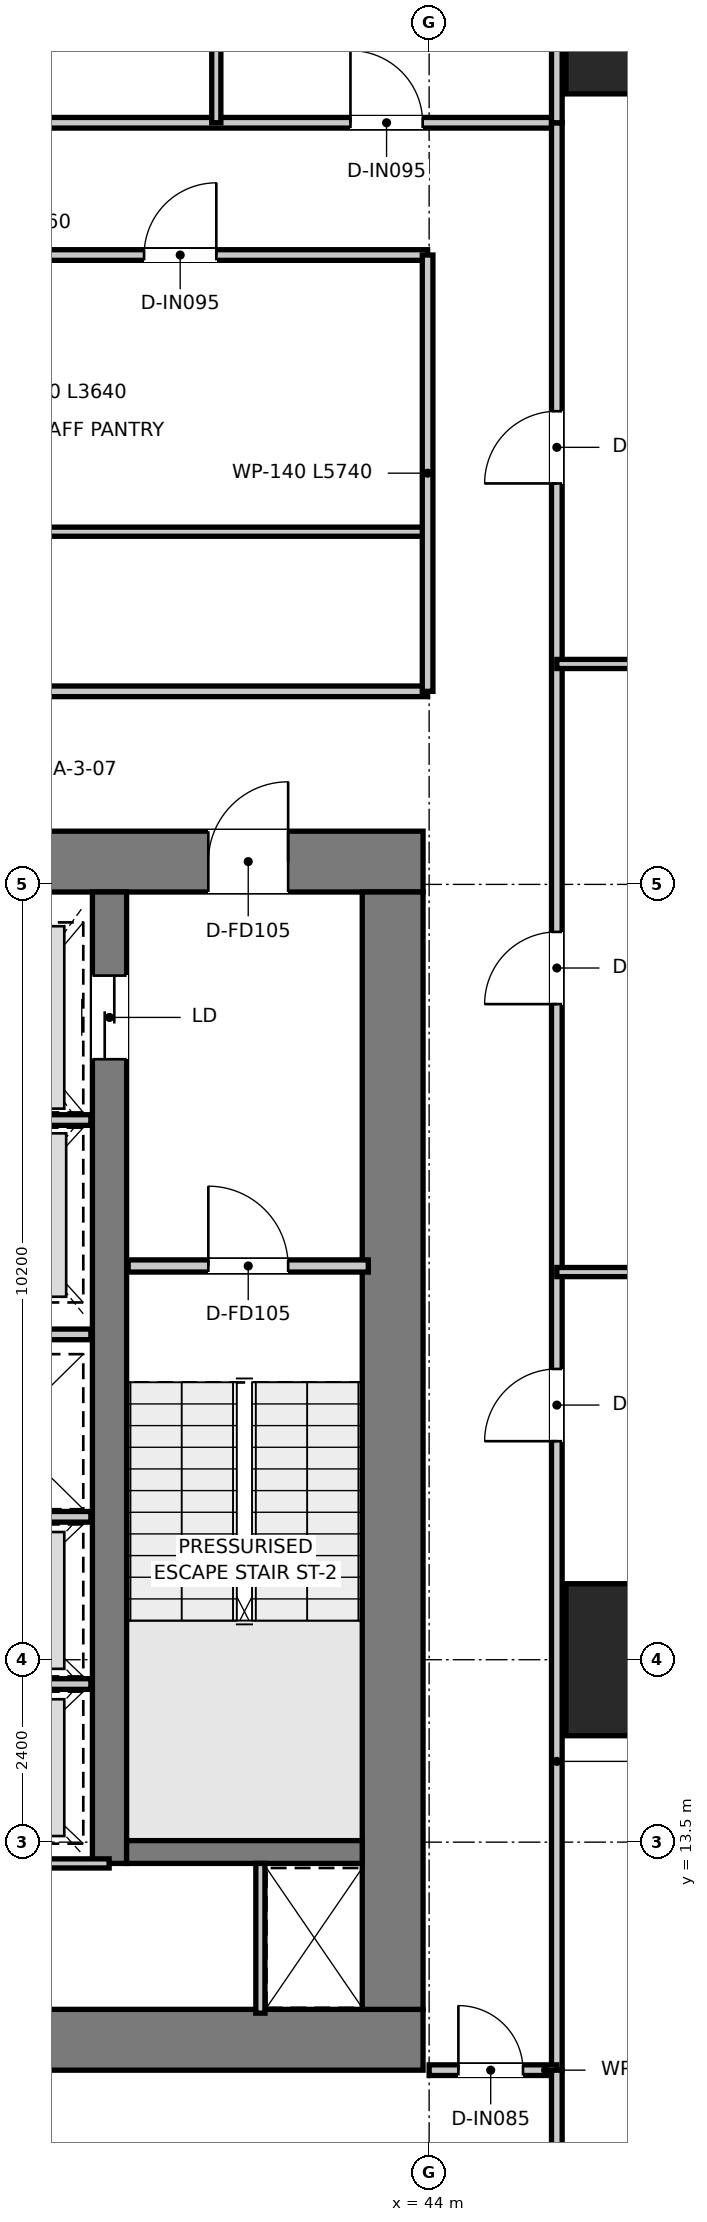
"""IFC4 building model, lengths in metres.
Left out: names, types, materials, properties, quantities, classifications, styles, units other than length and angle.
Written with IfcOpenShell. Run it as: python <this file> out.ifc"""

import sys

from ifc_helpers import new_model, si_unit, direction, frame, frame_2d, origin, origin_2d, place, context, subcontext, project, spatial, rectangle, extrude, source, transform, mapped, element, fill, save


model = new_model("IFC4")
c1 = context("Model", 3, precision=1e-05, world=origin(), true_north=direction((0.0, 1.0)))
c2 = subcontext(c1, "Body", "Model", "MODEL_VIEW")
j1 = project(units=[si_unit("LENGTHUNIT", "METRE"), si_unit("PLANEANGLEUNIT", "RADIAN")], contexts=[c1])
p1 = place(None, origin())
s1 = spatial("IfcSite", under=j1, at=p1, CompositionType="ELEMENT")
p2 = place(p1, origin())
s2 = spatial("IfcBuilding", under=s1, at=p2, CompositionType="ELEMENT")
p3 = place(p2, frame((0.0, 0.0, 97.95)))
s3 = spatial("IfcBuildingStorey", under=s2, at=p3, CompositionType="ELEMENT", Elevation=97.95)
p4 = place(p3, frame((28.08, 10.9, 0.0), z_axis=(0.0, 0.0, 1.0), x_axis=(1.0, 0.0, 0.0)))
e1 = element("IfcWall", 1, at=p4, inside=s3, PredefinedType="SHEAR", context=c2, shape_type="SweptSolid", body=[
    extrude(rectangle(XDim=15.84, YDim=0.8, at=frame_2d((7.92, 0.0))), origin(), (0.0, 0.0, 1.0), 3.95),
])
p5 = place(p3, frame((28.08, 26.4, 0.0), z_axis=(0.0, 0.0, 1.0), x_axis=(1.0, 0.0, 0.0)))
e2 = element("IfcWall", 2, at=p5, inside=s3, PredefinedType="SHEAR", context=c2, shape_type="SweptSolid", body=[
    extrude(rectangle(XDim=15.84, YDim=0.8, at=frame_2d((7.92, 0.0))), origin(), (0.0, 0.0, 1.0), 3.95),
])
p6 = place(p5, frame((7.22, 0.0, 0.0)))
e3 = element("IfcOpeningElement", 3, at=p6, cuts=e2, PredefinedType="OPENING", context=c2, shape_type="SweptSolid", body=[
    extrude(rectangle(XDim=1.4, YDim=2.2, at=frame_2d((0.7, 1.1))), frame((0.0, 0.41, 0.0), z_axis=(0.0, -1.0, 0.0), x_axis=(1.0, 0.0, 0.0)), (0.0, 0.0, 1.0), 0.82),
])
p7 = place(p5, frame((1.775, 0.0, 0.0)))
e4 = element("IfcOpeningElement", 4, at=p7, cuts=e2, PredefinedType="OPENING", context=c2, shape_type="SweptSolid", body=[
    extrude(rectangle(XDim=1.05, YDim=2.1, at=frame_2d((0.525, 1.05))), frame((0.0, 0.41, 0.0), z_axis=(0.0, -1.0, 0.0), x_axis=(1.0, 0.0, 0.0)), (0.0, 0.0, 1.0), 0.82),
])
p8 = place(p5, frame((13.015, 0.0, 0.0)))
e5 = element("IfcOpeningElement", 5, at=p8, cuts=e2, PredefinedType="OPENING", context=c2, shape_type="SweptSolid", body=[
    extrude(rectangle(XDim=1.05, YDim=2.1, at=frame_2d((0.525, 1.05))), frame((0.0, 0.41, 0.0), z_axis=(0.0, -1.0, 0.0), x_axis=(1.0, 0.0, 0.0)), (0.0, 0.0, 1.0), 0.82),
])
p9 = place(p3, frame((43.52, 11.3, 0.0), z_axis=(0.0, 0.0, 1.0), x_axis=(0.0, 1.0, 0.0)))
e6 = element("IfcWall", 6, at=p9, inside=s3, PredefinedType="SHEAR", context=c2, shape_type="SweptSolid", body=[
    extrude(rectangle(XDim=14.7, YDim=0.8, at=frame_2d((7.35, 0.0))), origin(), (0.0, 0.0, 1.0), 3.95),
])
p10 = place(p3, frame((39.795, 13.22, 0.0), z_axis=(0.0, 0.0, 1.0), x_axis=(0.0, 1.0, 0.0)))
e7 = element("IfcWall", 7, at=p10, inside=s3, PredefinedType="SHEAR", context=c2, shape_type="SweptSolid", body=[
    extrude(rectangle(XDim=12.78, YDim=0.45, at=frame_2d((6.39, 0.0))), origin(), (0.0, 0.0, 1.0), 3.95),
])
p11 = place(p10, frame((10.58, 0.0, 0.0)))
e8 = element("IfcOpeningElement", 8, at=p11, cuts=e7, PredefinedType="OPENING", context=c2, shape_type="SweptSolid", body=[
    extrude(rectangle(XDim=1.1, YDim=2.15, at=frame_2d((0.55, 1.075))), frame((0.0, 0.235, 0.0), z_axis=(0.0, -1.0, 0.0), x_axis=(1.0, 0.0, 0.0)), (0.0, 0.0, 1.0), 0.47),
])
p12 = place(p3, frame((40.02, 13.37, 0.0), z_axis=(0.0, 0.0, 1.0), x_axis=(1.0, 0.0, 0.0)))
e9 = element("IfcWall", 9, at=p12, inside=s3, PredefinedType="SHEAR", context=c2, shape_type="SweptSolid", body=[
    extrude(rectangle(XDim=3.1, YDim=0.3, at=frame_2d((1.55, 0.0))), origin(), (0.0, 0.0, 1.0), 3.95),
])
m1 = source(origin(), c2, "Body", "SweptSolid", [
    extrude(rectangle(XDim=2.0, YDim=2.0, at=origin_2d()), origin(), (0.0, 0.0, 1.0), 3.95),
])
for number, where, z_axis, x_axis in (
    (10, (46.8, 15.9, 0.0), (0.0, 0.0, 1.0), (1.0, 0.0, 0.0)),
    (11, (46.8, 37.5, 0.0), (0.0, 0.0, 1.0), (1.0, 0.0, 0.0)),
):
    element("IfcColumn", number, at=place(p3, frame(where, z_axis=z_axis, x_axis=x_axis)), inside=s3, PredefinedType="USERDEFINED", context=c2, shape_type="MappedRepresentation", body=[
        mapped(m1, transform((0.0, 0.0, 0.0), x_axis=(1.0, 0.0, 0.0), y_axis=(0.0, 1.0, 0.0), z_axis=(0.0, 0.0, 1.0), scale=1.0)),
    ])
p13 = place(p3, frame((40.04, 21.08, 0.0), z_axis=(0.0, 0.0, 1.0), x_axis=(1.0, 0.0, 0.0)))
e12 = element("IfcWall", 12, at=p13, inside=s3, PredefinedType="PARTITIONING", context=c2, shape_type="SweptSolid", body=[
    extrude(rectangle(XDim=3.16, YDim=0.16, at=frame_2d((1.58, 0.0))), origin(), (0.0, 0.0, 1.0), 3.67),
])
p14 = place(p13, frame((1.055, 0.0, 0.0)))
e13 = element("IfcOpeningElement", 13, at=p14, cuts=e12, PredefinedType="OPENING", context=c2, shape_type="SweptSolid", body=[
    extrude(rectangle(XDim=1.05, YDim=2.1, at=frame_2d((0.525, 1.05))), frame((0.0, 0.09, 0.0), z_axis=(0.0, -1.0, 0.0), x_axis=(1.0, 0.0, 0.0)), (0.0, 0.0, 1.0), 0.18),
])
p15 = place(p3, frame((37.28, 23.0, 0.0), z_axis=(0.0, 0.0, 1.0), x_axis=(1.0, 0.0, 0.0)))
e14 = element("IfcWall", 14, at=p15, inside=s3, PredefinedType="PARTITIONING", context=c2, shape_type="SweptSolid", body=[
    extrude(rectangle(XDim=2.27, YDim=0.14, at=frame_2d((1.135, 0.0))), origin(), (0.0, 0.0, 1.0), 2.47),
])
for number, where, z_axis, x_axis in (
    (15, (37.28, 17.78, 0.0), (0.0, 0.0, 1.0), (1.0, 0.0, 0.0)),
    (16, (37.28, 20.18, 0.0), (0.0, 0.0, 1.0), (1.0, 0.0, 0.0)),
    (17, (37.28, 15.58, 0.0), (0.0, 0.0, 1.0), (1.0, 0.0, 0.0)),
):
    element("IfcWall", number, at=place(p3, frame(where, z_axis=z_axis, x_axis=x_axis)), inside=s3, PredefinedType="PARTITIONING", context=c2, shape_type="SweptSolid", body=[
        extrude(rectangle(XDim=2.27, YDim=0.14, at=frame_2d((1.135, 0.0))), origin(), (0.0, 0.0, 1.0), 3.67),
    ])
p16 = place(p3, frame((41.78, 11.25, 0.0), z_axis=(0.0, 0.0, 1.0), x_axis=(0.0, 1.0, 0.0)))
e18 = element("IfcWall", 18, at=p16, inside=s3, PredefinedType="PARTITIONING", context=c2, shape_type="SweptSolid", body=[
    extrude(rectangle(XDim=1.97, YDim=0.12, at=frame_2d((0.985, 0.0))), origin(), (0.0, 0.0, 1.0), 3.67),
])
p17 = place(p3, frame((32.21, 13.22, 0.0), z_axis=(0.0, 0.0, 1.0), x_axis=(1.0, 0.0, 0.0)))
e19 = element("IfcWall", 19, at=p17, inside=s3, PredefinedType="PARTITIONING", context=c2, shape_type="SweptSolid", body=[
    extrude(rectangle(XDim=7.58, YDim=0.12, at=frame_2d((3.79, 0.0))), origin(), (0.0, 0.0, 1.0), 3.67),
])
p18 = place(p17, frame((3.365, 0.0, 0.0)))
e20 = element("IfcOpeningElement", 20, at=p18, cuts=e19, PredefinedType="OPENING", context=c2, shape_type="SweptSolid", body=[
    extrude(rectangle(XDim=0.85, YDim=2.1, at=frame_2d((0.425, 1.05))), frame((0.0, 0.07, 0.0), z_axis=(0.0, -1.0, 0.0), x_axis=(1.0, 0.0, 0.0)), (0.0, 0.0, 1.0), 0.14),
])
p19 = place(p3, frame((28.02, 28.64, 0.0), z_axis=(0.0, 0.0, 1.0), x_axis=(1.0, 0.0, 0.0)))
e21 = element("IfcWall", 21, at=p19, inside=s3, PredefinedType="PARTITIONING", context=c2, shape_type="SweptSolid", body=[
    extrude(rectangle(XDim=15.96, YDim=0.14, at=frame_2d((7.98, 0.0))), origin(), (0.0, 0.0, 1.0), 3.08),
])
p20 = place(p19, frame((7.455, 0.0, 0.0)))
e22 = element("IfcOpeningElement", 22, at=p20, cuts=e21, PredefinedType="OPENING", context=c2, shape_type="SweptSolid", body=[
    extrude(rectangle(XDim=1.05, YDim=2.15, at=frame_2d((0.525, 1.075))), frame((0.0, 0.08, 0.0), z_axis=(0.0, -1.0, 0.0), x_axis=(1.0, 0.0, 0.0)), (0.0, 0.0, 1.0), 0.16),
])
p21 = place(p3, frame((28.02, 30.74, 0.0), z_axis=(0.0, 0.0, 1.0), x_axis=(1.0, 0.0, 0.0)))
e23 = element("IfcWall", 23, at=p21, inside=s3, PredefinedType="PARTITIONING", context=c2, shape_type="SweptSolid", body=[
    extrude(rectangle(XDim=15.96, YDim=0.12, at=frame_2d((7.98, 0.0))), origin(), (0.0, 0.0, 1.0), 3.08),
])
p22 = place(p3, frame((28.02, 34.38, 0.0), z_axis=(0.0, 0.0, 1.0), x_axis=(1.0, 0.0, 0.0)))
e24 = element("IfcWall", 24, at=p22, inside=s3, PredefinedType="PARTITIONING", context=c2, shape_type="SweptSolid", body=[
    extrude(rectangle(XDim=15.96, YDim=0.14, at=frame_2d((7.98, 0.0))), origin(), (0.0, 0.0, 1.0), 3.08),
])
p23 = place(p22, frame((1.13, 0.0, 0.0)))
e25 = element("IfcOpeningElement", 25, at=p23, cuts=e24, PredefinedType="OPENING", context=c2, shape_type="SweptSolid", body=[
    extrude(rectangle(XDim=0.9, YDim=2.1, at=frame_2d((0.45, 1.05))), frame((0.0, 0.08, 0.0), z_axis=(0.0, -1.0, 0.0), x_axis=(1.0, 0.0, 0.0)), (0.0, 0.0, 1.0), 0.16),
])
p24 = place(p22, frame((4.33, 0.0, 0.0)))
e26 = element("IfcOpeningElement", 26, at=p24, cuts=e24, PredefinedType="OPENING", context=c2, shape_type="SweptSolid", body=[
    extrude(rectangle(XDim=0.9, YDim=2.1, at=frame_2d((0.45, 1.05))), frame((0.0, 0.08, 0.0), z_axis=(0.0, -1.0, 0.0), x_axis=(1.0, 0.0, 0.0)), (0.0, 0.0, 1.0), 0.16),
])
p25 = place(p22, frame((7.355, 0.0, 0.0)))
e27 = element("IfcOpeningElement", 27, at=p25, cuts=e24, PredefinedType="OPENING", context=c2, shape_type="SweptSolid", body=[
    extrude(rectangle(XDim=0.95, YDim=2.1, at=frame_2d((0.475, 1.05))), frame((0.0, 0.08, 0.0), z_axis=(0.0, -1.0, 0.0), x_axis=(1.0, 0.0, 0.0)), (0.0, 0.0, 1.0), 0.16),
])
p26 = place(p22, frame((12.23, 0.0, 0.0)))
e28 = element("IfcOpeningElement", 28, at=p26, cuts=e24, PredefinedType="OPENING", context=c2, shape_type="SweptSolid", body=[
    extrude(rectangle(XDim=0.95, YDim=2.1, at=frame_2d((0.475, 1.05))), frame((0.0, 0.08, 0.0), z_axis=(0.0, -1.0, 0.0), x_axis=(1.0, 0.0, 0.0)), (0.0, 0.0, 1.0), 0.16),
])
p27 = place(p3, frame((43.98, 28.64, 0.0), z_axis=(0.0, 0.0, 1.0), x_axis=(0.0, 1.0, 0.0)))
e29 = element("IfcWall", 29, at=p27, inside=s3, PredefinedType="PARTITIONING", context=c2, shape_type="SweptSolid", body=[
    extrude(rectangle(XDim=5.74, YDim=0.14, at=frame_2d((2.87, 0.0))), origin(), (0.0, 0.0, 1.0), 3.27),
])
p28 = place(p3, frame((26.32, 36.12, 0.0), z_axis=(0.0, 0.0, 1.0), x_axis=(1.0, 0.0, 0.0)))
e30 = element("IfcWall", 30, at=p28, inside=s3, PredefinedType="PARTITIONING", context=c2, shape_type="SweptSolid", body=[
    extrude(rectangle(XDim=19.36, YDim=0.14, at=frame_2d((9.68, 0.0))), origin(), (0.0, 0.0, 1.0), 3.08),
])
p29 = place(p28, frame((1.265, 0.0, 0.0)))
e31 = element("IfcOpeningElement", 31, at=p29, cuts=e30, PredefinedType="OPENING", context=c2, shape_type="SweptSolid", body=[
    extrude(rectangle(XDim=0.95, YDim=2.1, at=frame_2d((0.475, 1.05))), frame((0.0, 0.08, 0.0), z_axis=(0.0, -1.0, 0.0), x_axis=(1.0, 0.0, 0.0)), (0.0, 0.0, 1.0), 0.16),
])
p30 = place(p28, frame((5.855, 0.0, 0.0)))
e32 = element("IfcOpeningElement", 32, at=p30, cuts=e30, PredefinedType="OPENING", context=c2, shape_type="SweptSolid", body=[
    extrude(rectangle(XDim=0.95, YDim=2.1, at=frame_2d((0.475, 1.05))), frame((0.0, 0.08, 0.0), z_axis=(0.0, -1.0, 0.0), x_axis=(1.0, 0.0, 0.0)), (0.0, 0.0, 1.0), 0.16),
])
p31 = place(p28, frame((11.555, 0.0, 0.0)))
e33 = element("IfcOpeningElement", 33, at=p31, cuts=e30, PredefinedType="OPENING", context=c2, shape_type="SweptSolid", body=[
    extrude(rectangle(XDim=0.95, YDim=2.1, at=frame_2d((0.475, 1.05))), frame((0.0, 0.08, 0.0), z_axis=(0.0, -1.0, 0.0), x_axis=(1.0, 0.0, 0.0)), (0.0, 0.0, 1.0), 0.16),
])
p32 = place(p28, frame((16.645, 0.0, 0.0)))
e34 = element("IfcOpeningElement", 34, at=p32, cuts=e30, PredefinedType="OPENING", context=c2, shape_type="SweptSolid", body=[
    extrude(rectangle(XDim=0.95, YDim=2.1, at=frame_2d((0.475, 1.05))), frame((0.0, 0.08, 0.0), z_axis=(0.0, -1.0, 0.0), x_axis=(1.0, 0.0, 0.0)), (0.0, 0.0, 1.0), 0.16),
])
p33 = place(p3, frame((45.68, 10.5, 0.0), z_axis=(0.0, 0.0, 1.0), x_axis=(0.0, 1.0, 0.0)))
e35 = element("IfcWall", 35, at=p33, inside=s3, PredefinedType="PARTITIONING", context=c2, shape_type="SweptSolid", body=[
    extrude(rectangle(XDim=25.62, YDim=0.14, at=frame_2d((12.81, 0.0))), origin(), (0.0, 0.0, 1.0), 2.97),
])
p34 = place(p33, frame((8.275, 0.0, 0.0)))
e36 = element("IfcOpeningElement", 36, at=p34, cuts=e35, PredefinedType="OPENING", context=c2, shape_type="SweptSolid", body=[
    extrude(rectangle(XDim=0.95, YDim=2.1, at=frame_2d((0.475, 1.05))), frame((0.0, 0.08, 0.0), z_axis=(0.0, -1.0, 0.0), x_axis=(1.0, 0.0, 0.0)), (0.0, 0.0, 1.0), 0.16),
])
p35 = place(p33, frame((14.025, 0.0, 0.0)))
e37 = element("IfcOpeningElement", 37, at=p35, cuts=e35, PredefinedType="OPENING", context=c2, shape_type="SweptSolid", body=[
    extrude(rectangle(XDim=0.95, YDim=2.1, at=frame_2d((0.475, 1.05))), frame((0.0, 0.08, 0.0), z_axis=(0.0, -1.0, 0.0), x_axis=(1.0, 0.0, 0.0)), (0.0, 0.0, 1.0), 0.16),
])
p36 = place(p33, frame((20.875, 0.0, 0.0)))
e38 = element("IfcOpeningElement", 38, at=p36, cuts=e35, PredefinedType="OPENING", context=c2, shape_type="SweptSolid", body=[
    extrude(rectangle(XDim=0.95, YDim=2.1, at=frame_2d((0.475, 1.05))), frame((0.0, 0.08, 0.0), z_axis=(0.0, -1.0, 0.0), x_axis=(1.0, 0.0, 0.0)), (0.0, 0.0, 1.0), 0.16),
])
p37 = place(p3, frame((44.0, 10.5, 0.0), z_axis=(0.0, 0.0, 1.0), x_axis=(1.0, 0.0, 0.0)))
e39 = element("IfcWall", 39, at=p37, inside=s3, PredefinedType="PARTITIONING", context=c2, shape_type="SweptSolid", body=[
    extrude(rectangle(XDim=1.68, YDim=0.14, at=frame_2d((0.84, 0.0))), origin(), (0.0, 0.0, 1.0), 3.67),
])
p38 = place(p37, frame((0.385, 0.0, 0.0)))
e40 = element("IfcOpeningElement", 40, at=p38, cuts=e39, PredefinedType="OPENING", context=c2, shape_type="SweptSolid", body=[
    extrude(rectangle(XDim=0.85, YDim=2.1, at=frame_2d((0.425, 1.05))), frame((0.0, 0.08, 0.0), z_axis=(0.0, -1.0, 0.0), x_axis=(1.0, 0.0, 0.0)), (0.0, 0.0, 1.0), 0.16),
])
p39 = place(p3, frame((45.68, 36.12, 0.0), z_axis=(0.0, 0.0, 1.0), x_axis=(0.0, 1.0, 0.0)))
e41 = element("IfcWall", 41, at=p39, inside=s3, PredefinedType="PARTITIONING", context=c2, shape_type="SweptSolid", body=[
    extrude(rectangle(XDim=12.127, YDim=0.14, at=frame_2d((6.063, 0.0))), origin(), (0.0, 0.0, 1.0), 2.97),
])
p40 = place(p3, frame((45.68, 0.01, 0.0), z_axis=(0.0, 0.0, 1.0), x_axis=(0.0, 1.0, 0.0)))
e42 = element("IfcWall", 42, at=p40, inside=s3, PredefinedType="PARTITIONING", context=c2, shape_type="SweptSolid", body=[
    extrude(rectangle(XDim=10.49, YDim=0.14, at=frame_2d((5.245, 0.0))), origin(), (0.0, 0.0, 1.0), 3.67),
])
p41 = place(p3, frame((41.2, 36.12, 0.0), z_axis=(0.0, 0.0, 1.0), x_axis=(0.0, 1.0, 0.0)))
e43 = element("IfcWall", 43, at=p41, inside=s3, PredefinedType="PARTITIONING", context=c2, shape_type="SweptSolid", body=[
    extrude(rectangle(XDim=13.317, YDim=0.12, at=frame_2d((6.658, 0.0))), origin(), (0.0, 0.0, 1.0), 2.97),
])
p42 = place(p3, frame((45.68, 21.0, 0.0), z_axis=(0.0, 0.0, 1.0), x_axis=(1.0, 0.0, 0.0)))
e44 = element("IfcWall", 44, at=p42, inside=s3, PredefinedType="PARTITIONING", context=c2, shape_type="SweptSolid", body=[
    extrude(rectangle(XDim=10.715, YDim=0.12, at=frame_2d((5.358, 0.0))), origin(), (0.0, 0.0, 1.0), 2.97),
])
p43 = place(p3, frame((45.68, 29.0, 0.0), z_axis=(0.0, 0.0, 1.0), x_axis=(1.0, 0.0, 0.0)))
e45 = element("IfcWall", 45, at=p43, inside=s3, PredefinedType="PARTITIONING", context=c2, shape_type="SweptSolid", body=[
    extrude(rectangle(XDim=15.049, YDim=0.12, at=frame_2d((7.525, 0.0))), origin(), (0.0, 0.0, 1.0), 2.97),
])
p44 = place(p14, origin())
e46 = element("IfcDoor", 46, at=p44, inside=s3, OperationType="SINGLE_SWING_LEFT", PredefinedType="DOOR", context=c2, shape_type="SweptSolid", body=[
    extrude(rectangle(XDim=1.05, YDim=2.1, at=frame_2d((0.525, 1.05))), frame((0.0, 0.025, 0.0), z_axis=(0.0, -1.0, 0.0), x_axis=(1.0, 0.0, 0.0)), (0.0, 0.0, 1.0), 0.05),
])
fill(e13, e46)
p45 = place(p8, origin())
e47 = element("IfcDoor", 47, at=p45, inside=s3, OperationType="SINGLE_SWING_RIGHT", PredefinedType="DOOR", context=c2, shape_type="SweptSolid", body=[
    extrude(rectangle(XDim=1.05, YDim=2.1, at=frame_2d((0.525, 1.05))), frame((0.0, 0.025, 0.0), z_axis=(0.0, -1.0, 0.0), x_axis=(1.0, 0.0, 0.0)), (0.0, 0.0, 1.0), 0.05),
])
fill(e5, e47)
p46 = place(p11, origin())
e48 = element("IfcDoor", 48, at=p46, inside=s3, OperationType="DOUBLE_DOOR_SLIDING", PredefinedType="DOOR", context=c2, shape_type="SweptSolid", body=[
    extrude(rectangle(XDim=1.1, YDim=2.15, at=frame_2d((0.55, 1.075))), frame((0.0, 0.025, 0.0), z_axis=(0.0, -1.0, 0.0), x_axis=(1.0, 0.0, 0.0)), (0.0, 0.0, 1.0), 0.05),
])
fill(e8, e48)
p47 = place(p26, origin())
e49 = element("IfcDoor", 49, at=p47, inside=s3, OperationType="SINGLE_SWING_RIGHT", PredefinedType="DOOR", context=c2, shape_type="SweptSolid", body=[
    extrude(rectangle(XDim=0.95, YDim=2.1, at=frame_2d((0.475, 1.05))), frame((0.0, 0.025, 0.0), z_axis=(0.0, -1.0, 0.0), x_axis=(1.0, 0.0, 0.0)), (0.0, 0.0, 1.0), 0.05),
])
fill(e28, e49)
p48 = place(p32, origin())
e50 = element("IfcDoor", 50, at=p48, inside=s3, OperationType="SINGLE_SWING_LEFT", PredefinedType="DOOR", context=c2, shape_type="SweptSolid", body=[
    extrude(rectangle(XDim=0.95, YDim=2.1, at=frame_2d((0.475, 1.05))), frame((0.0, 0.025, 0.0), z_axis=(0.0, -1.0, 0.0), x_axis=(1.0, 0.0, 0.0)), (0.0, 0.0, 1.0), 0.05),
])
fill(e34, e50)
p49 = place(p34, origin())
e51 = element("IfcDoor", 51, at=p49, inside=s3, OperationType="SINGLE_SWING_LEFT", PredefinedType="DOOR", context=c2, shape_type="SweptSolid", body=[
    extrude(rectangle(XDim=0.95, YDim=2.1, at=frame_2d((0.475, 1.05))), frame((0.0, 0.025, 0.0), z_axis=(0.0, -1.0, 0.0), x_axis=(1.0, 0.0, 0.0)), (0.0, 0.0, 1.0), 0.05),
])
fill(e36, e51)
p50 = place(p35, origin())
e52 = element("IfcDoor", 52, at=p50, inside=s3, OperationType="SINGLE_SWING_LEFT", PredefinedType="DOOR", context=c2, shape_type="SweptSolid", body=[
    extrude(rectangle(XDim=0.95, YDim=2.1, at=frame_2d((0.475, 1.05))), frame((0.0, 0.025, 0.0), z_axis=(0.0, -1.0, 0.0), x_axis=(1.0, 0.0, 0.0)), (0.0, 0.0, 1.0), 0.05),
])
fill(e37, e52)
p51 = place(p36, origin())
e53 = element("IfcDoor", 53, at=p51, inside=s3, OperationType="SINGLE_SWING_LEFT", PredefinedType="DOOR", context=c2, shape_type="SweptSolid", body=[
    extrude(rectangle(XDim=0.95, YDim=2.1, at=frame_2d((0.475, 1.05))), frame((0.0, 0.025, 0.0), z_axis=(0.0, -1.0, 0.0), x_axis=(1.0, 0.0, 0.0)), (0.0, 0.0, 1.0), 0.05),
])
fill(e38, e53)
p52 = place(p38, origin())
e54 = element("IfcDoor", 54, at=p52, inside=s3, OperationType="SINGLE_SWING_LEFT", PredefinedType="DOOR", context=c2, shape_type="SweptSolid", body=[
    extrude(rectangle(XDim=0.85, YDim=2.1, at=frame_2d((0.425, 1.05))), frame((0.0, 0.025, 0.0), z_axis=(0.0, -1.0, 0.0), x_axis=(1.0, 0.0, 0.0)), (0.0, 0.0, 1.0), 0.05),
])
fill(e40, e54)
save(model, sys.argv[1])
